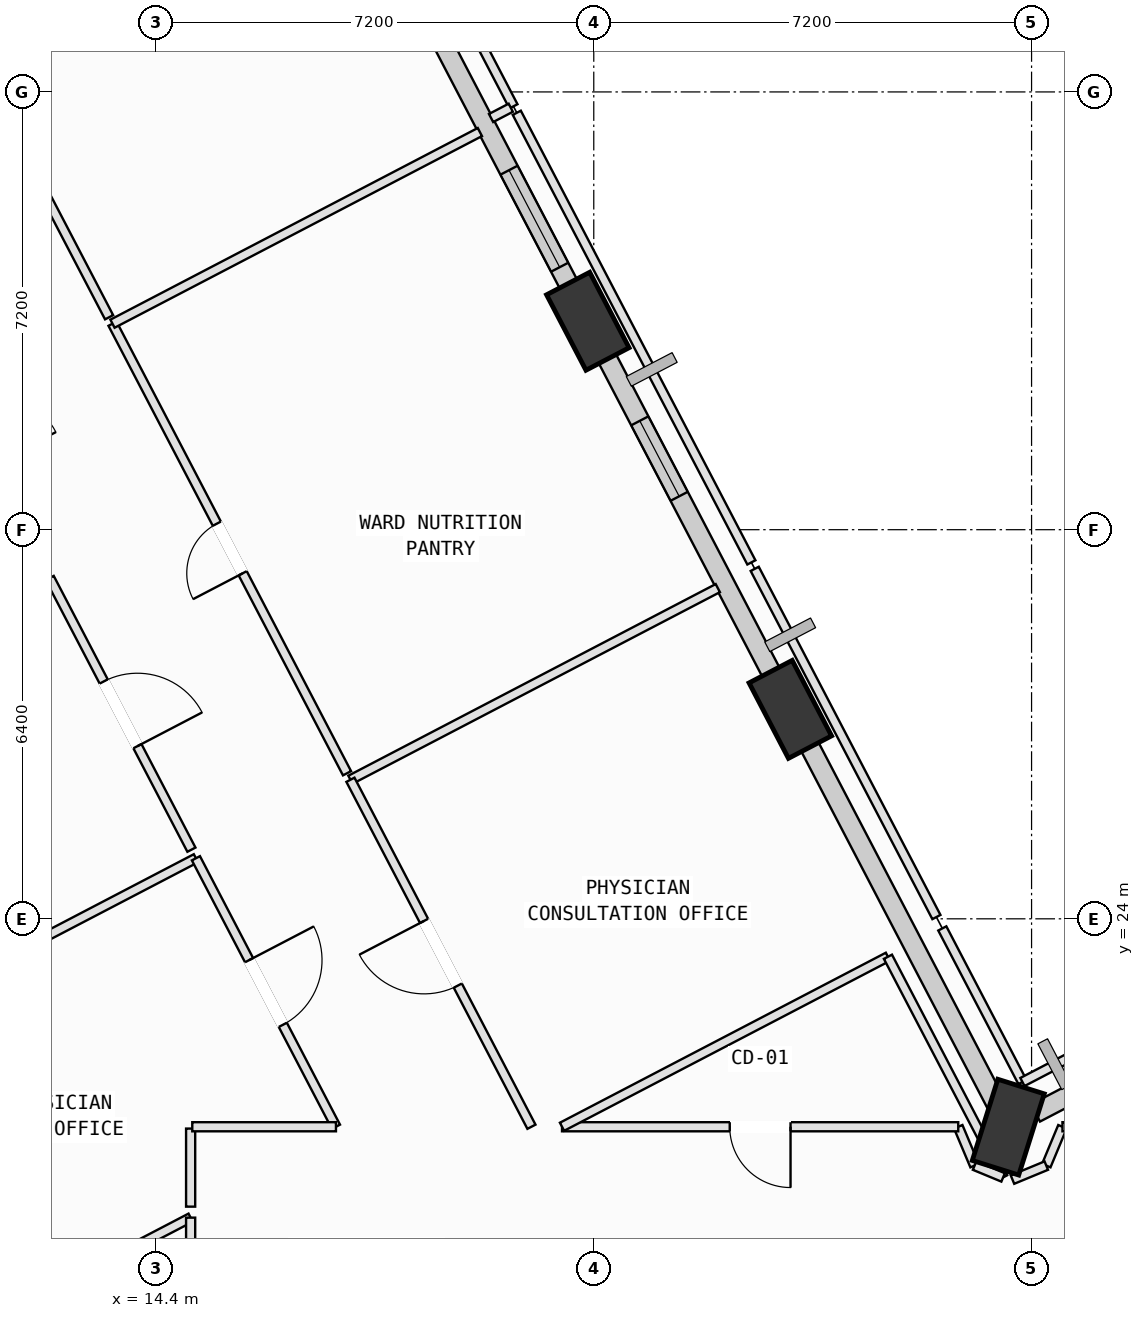
"""IFC4 building model, lengths in metres.
Left out: names, types, materials, properties, quantities, classifications, styles, units other than length and angle.
Written with IfcOpenShell. Run it as: python <this file> out.ifc"""

import sys

from ifc_helpers import new_model, si_unit, direction, frame, frame_2d, origin, origin_2d, place, context, subcontext, project, spatial, rectangle, extrude, element, fill, save


model = new_model("IFC4")
c1 = context("Model", 3, precision=1e-05, world=origin(), true_north=direction((0.0, 1.0)))
c2 = subcontext(c1, "Body", "Model", "MODEL_VIEW")
j1 = project(units=[si_unit("LENGTHUNIT", "METRE"), si_unit("PLANEANGLEUNIT", "RADIAN")], contexts=[c1])
p1 = place(None, origin())
s1 = spatial("IfcSite", under=j1, at=p1, CompositionType="ELEMENT")
p2 = place(p1, origin())
s2 = spatial("IfcBuilding", under=s1, at=p2, CompositionType="ELEMENT")
p3 = place(p2, frame((0.0, 0.0, 140.4)))
s3 = spatial("IfcBuildingStorey", under=s2, at=p3, CompositionType="ELEMENT", Elevation=140.4)
p4 = place(p3, frame((28.417, 20.573, 0.002), z_axis=(0.017686891787, -0.02131024809, 0.999616450037), x_axis=(-0.378280780857, 0.925313820027, 0.026419411466)))
e1 = element("IfcColumn", 1, at=p4, inside=s3, PredefinedType="COLUMN", context=c2, shape_type="SweptSolid", body=[
    extrude(rectangle(XDim=1.4, YDim=0.8, at=origin_2d()), origin(), (0.0, 0.0, 1.0), 3.975),
])
p5 = place(p3, frame((24.833, 27.445, 0.002), z_axis=(-0.01064440471, -0.036363255396, 0.999281947353), x_axis=(-0.194994759245, 0.980228833314, 0.033592829699)))
e2 = element("IfcColumn", 2, at=p5, inside=s3, PredefinedType="COLUMN", context=c2, shape_type="SweptSolid", body=[
    extrude(rectangle(XDim=1.4, YDim=0.8, at=origin_2d()), origin(), (0.0, 0.0, 1.0), 3.968),
])
p6 = place(p3, frame((21.502, 33.828, 0.002), z_axis=(-0.036932649589, -0.050396391412, 0.998046182863), x_axis=(0.149987895413, 0.987134715444, 0.055395710969)))
e3 = element("IfcColumn", 3, at=p6, inside=s3, PredefinedType="COLUMN", context=c2, shape_type="SweptSolid", body=[
    extrude(rectangle(XDim=1.4, YDim=0.8, at=origin_2d()), origin(), (0.0, 0.0, 1.0), 3.953),
])
p7 = place(p3, frame((18.727, 39.148, 0.002), z_axis=(-0.058783551583, -0.061942625482, 0.996347130879), x_axis=(0.272586926496, 0.959147545124, 0.075712311991)))
e4 = element("IfcColumn", 4, at=p7, inside=s3, PredefinedType="COLUMN", context=c2, shape_type="SweptSolid", body=[
    extrude(rectangle(XDim=1.4, YDim=0.8, at=origin_2d()), origin(), (0.0, 0.0, 1.0), 3.941),
])
p8 = place(p3, frame((28.865, 20.807, 0.0), z_axis=(0.0, 0.0, 1.0), x_axis=(0.886610408854, 0.462517008241, 0.0)))
e5 = element("IfcWall", 5, at=p8, inside=s3, PredefinedType="SOLIDWALL", context=c2, shape_type="SweptSolid", body=[
    extrude(rectangle(XDim=5.96, YDim=0.32, at=frame_2d((2.98, 0.0))), origin(), (0.0, 0.0, 1.0), 2.885),
])
p9 = place(p3, frame((25.086, 26.959, 0.0), z_axis=(0.0, 0.0, 1.0), x_axis=(0.462504291383, -0.886617042726, 0.0)))
e6 = element("IfcWall", 6, at=p9, inside=s3, PredefinedType="SOLIDWALL", context=c2, shape_type="SweptSolid", body=[
    extrude(rectangle(XDim=6.76, YDim=0.32, at=frame_2d((3.38, 0.0))), origin(), (0.0, 0.0, 1.0), 3.085),
])
p10 = place(p3, frame((21.751, 33.351, 0.0), z_axis=(0.0, 0.0, 1.0), x_axis=(0.462527122244, -0.88660513262, 0.0)))
e7 = element("IfcWall", 7, at=p10, inside=s3, PredefinedType="SOLIDWALL", context=c2, shape_type="SweptSolid", body=[
    extrude(rectangle(XDim=6.223, YDim=0.32, at=frame_2d((3.111, 0.0))), origin(), (0.0, 0.0, 1.0), 3.085),
])
p11 = place(p10, frame((1.309, 0.0, 0.75)))
e8 = element("IfcOpeningElement", 8, at=p11, cuts=e7, PredefinedType="OPENING", context=c2, shape_type="SweptSolid", body=[
    extrude(rectangle(XDim=1.4, YDim=1.85, at=frame_2d((0.7, 0.925))), frame((0.0, 0.17, 0.0), z_axis=(0.0, -1.0, 0.0), x_axis=(1.0, 0.0, 0.0)), (0.0, 0.0, 1.0), 0.34),
])
p12 = place(p3, frame((18.97, 38.683, 0.0), z_axis=(0.0, 0.0, 1.0), x_axis=(0.462529637731, -0.886603820328, 0.0)))
e9 = element("IfcWall", 9, at=p12, inside=s3, PredefinedType="SOLIDWALL", context=c2, shape_type="SweptSolid", body=[
    extrude(rectangle(XDim=5.047, YDim=0.32, at=frame_2d((2.523, 0.0))), origin(), (0.0, 0.0, 1.0), 3.085),
])
p13 = place(p12, frame((2.673, 0.0, 0.75)))
e10 = element("IfcOpeningElement", 10, at=p13, cuts=e9, PredefinedType="OPENING", context=c2, shape_type="SweptSolid", body=[
    extrude(rectangle(XDim=1.8, YDim=2.05, at=frame_2d((0.9, 1.025))), frame((0.0, 0.17, 0.0), z_axis=(0.0, -1.0, 0.0), x_axis=(1.0, 0.0, 0.0)), (0.0, 0.0, 1.0), 0.34),
])
p14 = place(p3, frame((7.74, 15.314, 0.0), z_axis=(0.0, 0.0, 1.0), x_axis=(0.886643562376, 0.46245344987, 0.0)))
e11 = element("IfcWall", 11, at=p14, inside=s3, PredefinedType="PARTITIONING", context=c2, shape_type="SweptSolid", body=[
    extrude(rectangle(XDim=8.154, YDim=0.15, at=frame_2d((4.077, 0.0))), origin(), (0.0, 0.0, 1.0), 3.7),
])
p15 = place(p14, frame((3.477, 0.0, 0.0)))
e12 = element("IfcOpeningElement", 12, at=p15, cuts=e11, PredefinedType="OPENING", context=c2, shape_type="SweptSolid", body=[
    extrude(rectangle(XDim=1.2, YDim=2.15, at=frame_2d((0.6, 1.075))), frame((0.0, 0.085, 0.0), z_axis=(0.0, -1.0, 0.0), x_axis=(1.0, 0.0, 0.0)), (0.0, 0.0, 1.0), 0.17),
])
p16 = place(p3, frame((14.97, 19.085, 0.0), z_axis=(0.0, 0.0, 1.0), x_axis=(0.0, -1.0, 0.0)))
e13 = element("IfcWall", 13, at=p16, inside=s3, PredefinedType="PARTITIONING", context=c2, shape_type="SweptSolid", body=[
    extrude(rectangle(XDim=0.855, YDim=0.15, at=frame_2d((0.427, 0.0))), origin(), (0.0, 0.0, 1.0), 3.7),
])
p17 = place(p3, frame((14.97, 20.55, 0.0), z_axis=(0.0, 0.0, 1.0), x_axis=(0.0, -1.0, 0.0)))
e14 = element("IfcWall", 14, at=p17, inside=s3, PredefinedType="PARTITIONING", context=c2, shape_type="SweptSolid", body=[
    extrude(rectangle(XDim=1.284, YDim=0.15, at=frame_2d((0.642, 0.0))), origin(), (0.0, 0.0, 1.0), 2.885),
])
p18 = place(p3, frame((5.28, 19.895, 0.0), z_axis=(0.0, 0.0, 1.0), x_axis=(0.886580898603, 0.462573572777, 0.0)))
e15 = element("IfcWall", 15, at=p18, inside=s3, PredefinedType="PARTITIONING", context=c2, shape_type="SweptSolid", body=[
    extrude(rectangle(XDim=11.028, YDim=0.15, at=frame_2d((5.514, 0.0))), origin(), (0.0, 0.0, 1.0), 3.7),
])
p19 = place(p3, frame((15.057, 24.996, 0.0), z_axis=(0.0, 0.0, 1.0), x_axis=(0.462442035221, -0.886649515908, 0.0)))
e16 = element("IfcWall", 16, at=p19, inside=s3, PredefinedType="PARTITIONING", context=c2, shape_type="SweptSolid", body=[
    extrude(rectangle(XDim=4.98, YDim=0.15, at=frame_2d((2.49, 0.0))), origin(), (0.0, 0.0, 1.0), 3.7),
])
p20 = place(p19, frame((1.89, 0.0, 0.0)))
e17 = element("IfcOpeningElement", 17, at=p20, cuts=e16, PredefinedType="OPENING", context=c2, shape_type="SweptSolid", body=[
    extrude(rectangle(XDim=1.2, YDim=2.15, at=frame_2d((0.6, 1.075))), frame((0.0, 0.085, 0.0), z_axis=(0.0, -1.0, 0.0), x_axis=(1.0, 0.0, 0.0)), (0.0, 0.0, 1.0), 0.17),
])
p21 = place(p3, frame((17.36, 20.58, 0.0), z_axis=(0.0, 0.0, 1.0), x_axis=(-1.0, 0.0, 0.0)))
e18 = element("IfcWall", 18, at=p21, inside=s3, PredefinedType="PARTITIONING", context=c2, shape_type="SweptSolid", body=[
    extrude(rectangle(XDim=2.363, YDim=0.15, at=frame_2d((1.182, 0.0))), origin(), (0.0, 0.0, 1.0), 3.7),
])
p22 = place(p3, frame((2.93, 24.534, 0.0), z_axis=(0.0, 0.0, 1.0), x_axis=(0.886600327973, 0.462536332019, 0.0)))
e19 = element("IfcWall", 19, at=p22, inside=s3, PredefinedType="PARTITIONING", context=c2, shape_type="SweptSolid", body=[
    extrude(rectangle(XDim=10.966, YDim=0.15, at=frame_2d((5.483, 0.0))), origin(), (0.0, 0.0, 1.0), 3.285),
])
p23 = place(p3, frame((12.652, 29.606, 0.0), z_axis=(0.0, 0.0, 1.0), x_axis=(0.462435226927, -0.886653066817, 0.0)))
e20 = element("IfcWall", 20, at=p23, inside=s3, PredefinedType="PARTITIONING", context=c2, shape_type="SweptSolid", body=[
    extrude(rectangle(XDim=5.04, YDim=0.15, at=frame_2d((2.52, 0.0))), origin(), (0.0, 0.0, 1.0), 3.7),
])
p24 = place(p23, frame((1.92, 0.0, 0.0)))
e21 = element("IfcOpeningElement", 21, at=p24, cuts=e20, PredefinedType="OPENING", context=c2, shape_type="SweptSolid", body=[
    extrude(rectangle(XDim=1.2, YDim=2.15, at=frame_2d((0.6, 1.075))), frame((0.0, 0.085, 0.0), z_axis=(0.0, -1.0, 0.0), x_axis=(1.0, 0.0, 0.0)), (0.0, 0.0, 1.0), 0.17),
])
p25 = place(p3, frame((27.863, 19.941, 0.0), z_axis=(0.0, 0.0, 1.0), x_axis=(-0.387962564942, 0.921675131596, 0.0)))
e22 = element("IfcWall", 22, at=p25, inside=s3, PredefinedType="PARTITIONING", context=c2, shape_type="SweptSolid", body=[
    extrude(rectangle(XDim=0.693, YDim=0.15, at=frame_2d((0.347, 0.0))), origin(), (0.0, 0.0, 1.0), 3.7),
])
p26 = place(p3, frame((27.594, 20.58, 0.0), z_axis=(0.0, 0.0, 1.0), x_axis=(-1.0, 0.0, 0.0)))
e23 = element("IfcWall", 23, at=p26, inside=s3, PredefinedType="PARTITIONING", context=c2, shape_type="SweptSolid", body=[
    extrude(rectangle(XDim=6.516, YDim=0.15, at=frame_2d((3.258, 0.0))), origin(), (0.0, 0.0, 1.0), 3.7),
])
p27 = place(p26, frame((2.758, 0.0, 0.0)))
e24 = element("IfcOpeningElement", 24, at=p27, cuts=e23, PredefinedType="OPENING", context=c2, shape_type="SweptSolid", body=[
    extrude(rectangle(XDim=1.0, YDim=2.12, at=frame_2d((0.5, 1.06))), frame((0.0, 0.085, 0.0), z_axis=(0.0, -1.0, 0.0), x_axis=(1.0, 0.0, 0.0)), (0.0, 0.0, 1.0), 0.17),
])
p28 = place(p3, frame((21.078, 20.58, 0.0), z_axis=(0.0, 0.0, 1.0), x_axis=(0.886630926341, 0.46247767563, 0.0)))
e25 = element("IfcWall", 25, at=p28, inside=s3, PredefinedType="PARTITIONING", context=c2, shape_type="SweptSolid", body=[
    extrude(rectangle(XDim=6.045, YDim=0.15, at=frame_2d((3.023, 0.0))), origin(), (0.0, 0.0, 1.0), 3.7),
])
p29 = place(p3, frame((26.438, 23.376, 0.0), z_axis=(0.0, 0.0, 1.0), x_axis=(0.462700527586, -0.886514648368, 0.0)))
e26 = element("IfcWall", 26, at=p29, inside=s3, PredefinedType="PARTITIONING", context=c2, shape_type="SweptSolid", body=[
    extrude(rectangle(XDim=4.094, YDim=0.15, at=frame_2d((2.047, 0.0))), origin(), (0.0, 0.0, 1.0), 3.085),
])
p30 = place(p3, frame((28.332, 19.747, 0.0), z_axis=(0.0, 0.0, 1.0), x_axis=(-0.924169144122, 0.381983498403, 0.0)))
e27 = element("IfcWall", 27, at=p30, inside=s3, PredefinedType="PARTITIONING", context=c2, shape_type="SweptSolid", body=[
    extrude(rectangle(XDim=0.508, YDim=0.15, at=frame_2d((0.254, 0.0))), origin(), (0.0, 0.0, 1.0), 3.7),
])
p31 = place(p3, frame((29.308, 20.58, 0.0), z_axis=(0.0, 0.0, 1.0), x_axis=(-0.384364983418, -0.923181217054, 0.0)))
e28 = element("IfcWall", 28, at=p31, inside=s3, PredefinedType="PARTITIONING", context=c2, shape_type="SweptSolid", body=[
    extrude(rectangle(XDim=0.692, YDim=0.15, at=frame_2d((0.346, 0.0))), origin(), (0.0, 0.0, 1.0), 3.7),
])
p32 = place(p3, frame((29.042, 19.941, 0.0), z_axis=(0.0, 0.0, 1.0), x_axis=(-0.92404649346, -0.382280104014, 0.0)))
e29 = element("IfcWall", 29, at=p32, inside=s3, PredefinedType="PARTITIONING", context=c2, shape_type="SweptSolid", body=[
    extrude(rectangle(XDim=0.602, YDim=0.15, at=frame_2d((0.301, 0.0))), origin(), (0.0, 0.0, 1.0), 3.7),
])
p33 = place(p3, frame((27.332, 23.842, 0.0), z_axis=(0.0, 0.0, 1.0), x_axis=(0.462536722732, -0.88660012414, 0.0)))
e30 = element("IfcWall", 30, at=p33, inside=s3, PredefinedType="PARTITIONING", context=c2, shape_type="SweptSolid", body=[
    extrude(rectangle(XDim=2.849, YDim=0.15, at=frame_2d((1.425, 0.0))), origin(), (0.0, 0.0, 1.0), 3.7),
])
p34 = place(p3, frame((28.65, 21.316, 0.0), z_axis=(0.0, 0.0, 1.0), x_axis=(0.886634210414, 0.462471379573, 0.0)))
e31 = element("IfcWall", 31, at=p34, inside=s3, PredefinedType="PARTITIONING", context=c2, shape_type="SweptSolid", body=[
    extrude(rectangle(XDim=5.908, YDim=0.15, at=frame_2d((2.954, 0.0))), origin(), (0.0, 0.0, 1.0), 3.7),
])
p35 = place(p3, frame((34.462, 20.58, 0.0), z_axis=(0.0, 0.0, 1.0), x_axis=(-1.0, 0.0, 0.0)))
e32 = element("IfcWall", 32, at=p35, inside=s3, PredefinedType="PARTITIONING", context=c2, shape_type="SweptSolid", body=[
    extrude(rectangle(XDim=5.154, YDim=0.15, at=frame_2d((2.577, 0.0))), origin(), (0.0, 0.0, 1.0), 3.285),
])
p36 = place(p35, frame((2.077, 0.0, 0.0)))
e33 = element("IfcOpeningElement", 33, at=p36, cuts=e32, PredefinedType="OPENING", context=c2, shape_type="SweptSolid", body=[
    extrude(rectangle(XDim=1.0, YDim=2.12, at=frame_2d((0.5, 1.06))), frame((0.0, 0.085, 0.0), z_axis=(0.0, -1.0, 0.0), x_axis=(1.0, 0.0, 0.0)), (0.0, 0.0, 1.0), 0.17),
])
p37 = place(p3, frame((17.598, 26.287, 0.0), z_axis=(0.0, 0.0, 1.0), x_axis=(0.886614228897, 0.462509685431, 0.0)))
e34 = element("IfcWall", 34, at=p37, inside=s3, PredefinedType="PARTITIONING", context=c2, shape_type="SweptSolid", body=[
    extrude(rectangle(XDim=6.815, YDim=0.15, at=frame_2d((3.407, 0.0))), origin(), (0.0, 0.0, 1.0), 3.7),
])
p38 = place(p3, frame((24.247, 29.756, 0.0), z_axis=(0.0, 0.0, 1.0), x_axis=(0.462567298335, -0.886584172265, 0.0)))
e35 = element("IfcWall", 35, at=p38, inside=s3, PredefinedType="PARTITIONING", context=c2, shape_type="SweptSolid", body=[
    extrude(rectangle(XDim=6.46, YDim=0.15, at=frame_2d((3.23, 0.0))), origin(), (0.0, 0.0, 1.0), 3.7),
])
p39 = place(p3, frame((20.575, 20.58, 0.0), z_axis=(0.0, 0.0, 1.0), x_axis=(-0.462501194351, 0.886618658288, 0.0)))
e36 = element("IfcWall", 36, at=p39, inside=s3, PredefinedType="PARTITIONING", context=c2, shape_type="SweptSolid", body=[
    extrude(rectangle(XDim=6.437, YDim=0.15, at=frame_2d((3.218, 0.0))), origin(), (0.0, 0.0, 1.0), 3.7),
])
p40 = place(p39, frame((2.618, 0.0, 0.0)))
e37 = element("IfcOpeningElement", 37, at=p40, cuts=e36, PredefinedType="OPENING", context=c2, shape_type="SweptSolid", body=[
    extrude(rectangle(XDim=1.2, YDim=2.15, at=frame_2d((0.6, 1.075))), frame((0.0, 0.085, 0.0), z_axis=(0.0, -1.0, 0.0), x_axis=(1.0, 0.0, 0.0)), (0.0, 0.0, 1.0), 0.17),
])
p41 = place(p3, frame((17.542, 26.394, 0.0), z_axis=(0.0, 0.0, 1.0), x_axis=(-0.46248796698, 0.886625558169, 0.0)))
e38 = element("IfcWall", 38, at=p41, inside=s3, PredefinedType="PARTITIONING", context=c2, shape_type="SweptSolid", body=[
    extrude(rectangle(XDim=8.34, YDim=0.15, at=frame_2d((4.17, 0.0))), origin(), (0.0, 0.0, 1.0), 3.7),
])
p42 = place(p41, frame((3.71, 0.0, 0.0)))
e39 = element("IfcOpeningElement", 39, at=p42, cuts=e38, PredefinedType="OPENING", context=c2, shape_type="SweptSolid", body=[
    extrude(rectangle(XDim=0.92, YDim=2.1, at=frame_2d((0.46, 1.05))), frame((0.0, 0.085, 0.0), z_axis=(0.0, -1.0, 0.0), x_axis=(1.0, 0.0, 0.0)), (0.0, 0.0, 1.0), 0.17),
])
p43 = place(p3, frame((13.685, 33.788, 0.0), z_axis=(0.0, 0.0, 1.0), x_axis=(0.886614228897, 0.462509685431, 0.0)))
e40 = element("IfcWall", 40, at=p43, inside=s3, PredefinedType="PARTITIONING", context=c2, shape_type="SweptSolid", body=[
    extrude(rectangle(XDim=6.815, YDim=0.15, at=frame_2d((3.407, 0.0))), origin(), (0.0, 0.0, 1.0), 3.7),
])
p44 = place(p3, frame((20.334, 37.257, 0.0), z_axis=(0.0, 0.0, 1.0), x_axis=(0.462531995197, -0.886602590465, 0.0)))
e41 = element("IfcWall", 41, at=p44, inside=s3, PredefinedType="PARTITIONING", context=c2, shape_type="SweptSolid", body=[
    extrude(rectangle(XDim=8.341, YDim=0.15, at=frame_2d((4.17, 0.0))), origin(), (0.0, 0.0, 1.0), 3.7),
])
p45 = place(p3, frame((16.949, 43.747, 0.0), z_axis=(0.0, 0.0, 1.0), x_axis=(0.462487208348, -0.886625953892, 0.0)))
e42 = element("IfcWall", 42, at=p45, inside=s3, PredefinedType="PARTITIONING", context=c2, shape_type="SweptSolid", body=[
    extrude(rectangle(XDim=7.2, YDim=0.15, at=frame_2d((3.6, 0.0))), origin(), (0.0, 0.0, 1.0), 3.7),
])
p46 = place(p3, frame((20.235, 37.34, 0.0), z_axis=(0.0, 0.0, 1.0), x_axis=(-0.886549133333, -0.462634449849, 0.0)))
e43 = element("IfcWall", 43, at=p46, inside=s3, PredefinedType="PARTITIONING", context=c2, shape_type="SweptSolid", body=[
    extrude(rectangle(XDim=0.366, YDim=0.15, at=frame_2d((0.183, 0.0))), origin(), (0.0, 0.0, 1.0), 3.7),
])
p47 = place(p3, frame((13.629, 33.894, 0.0), z_axis=(0.0, 0.0, 1.0), x_axis=(-0.462450459837, 0.886645121904, 0.0)))
e44 = element("IfcWall", 44, at=p47, inside=s3, PredefinedType="PARTITIONING", context=c2, shape_type="SweptSolid", body=[
    extrude(rectangle(XDim=8.016, YDim=0.15, at=frame_2d((4.008, 0.0))), origin(), (0.0, 0.0, 1.0), 3.7),
])
p48 = place(p47, frame((3.548, 0.0, 0.0)))
e45 = element("IfcOpeningElement", 45, at=p48, cuts=e44, PredefinedType="OPENING", context=c2, shape_type="SweptSolid", body=[
    extrude(rectangle(XDim=0.92, YDim=2.1, at=frame_2d((0.46, 1.05))), frame((0.0, 0.085, 0.0), z_axis=(0.0, -1.0, 0.0), x_axis=(1.0, 0.0, 0.0)), (0.0, 0.0, 1.0), 0.17),
])
p49 = place(p11, origin())
e46 = element("IfcWindow", 46, at=p49, inside=s3, PartitioningType="SINGLE_PANEL", PredefinedType="WINDOW", context=c2, shape_type="SweptSolid", body=[
    extrude(rectangle(XDim=1.4, YDim=1.85, at=frame_2d((0.7, 0.925))), frame((0.0, 0.03, 0.0), z_axis=(0.0, -1.0, 0.0), x_axis=(1.0, 0.0, 0.0)), (0.0, 0.0, 1.0), 0.06),
])
fill(e8, e46)
p50 = place(p13, origin())
e47 = element("IfcWindow", 47, at=p50, inside=s3, PartitioningType="SINGLE_PANEL", PredefinedType="WINDOW", context=c2, shape_type="SweptSolid", body=[
    extrude(rectangle(XDim=1.8, YDim=2.05, at=frame_2d((0.9, 1.025))), frame((0.0, 0.03, 0.0), z_axis=(0.0, -1.0, 0.0), x_axis=(1.0, 0.0, 0.0)), (0.0, 0.0, 1.0), 0.06),
])
fill(e10, e47)
p51 = place(p20, origin())
e48 = element("IfcDoor", 48, at=p51, inside=s3, OperationType="SINGLE_SWING_LEFT", PredefinedType="DOOR", context=c2, shape_type="SweptSolid", body=[
    extrude(rectangle(XDim=1.2, YDim=2.15, at=frame_2d((0.6, 1.075))), frame((0.0, 0.025, 0.0), z_axis=(0.0, -1.0, 0.0), x_axis=(1.0, 0.0, 0.0)), (0.0, 0.0, 1.0), 0.05),
])
fill(e17, e48)
p52 = place(p24, origin())
e49 = element("IfcDoor", 49, at=p52, inside=s3, OperationType="SINGLE_SWING_RIGHT", PredefinedType="DOOR", context=c2, shape_type="SweptSolid", body=[
    extrude(rectangle(XDim=1.2, YDim=2.15, at=frame_2d((0.6, 1.075))), frame((0.0, 0.025, 0.0), z_axis=(0.0, -1.0, 0.0), x_axis=(1.0, 0.0, 0.0)), (0.0, 0.0, 1.0), 0.05),
])
fill(e21, e49)
p53 = place(p27, origin())
e50 = element("IfcDoor", 50, at=p53, inside=s3, OperationType="SINGLE_SWING_LEFT", PredefinedType="DOOR", context=c2, shape_type="SweptSolid", body=[
    extrude(rectangle(XDim=1.0, YDim=2.12, at=frame_2d((0.5, 1.06))), frame((0.0, 0.025, 0.0), z_axis=(0.0, -1.0, 0.0), x_axis=(1.0, 0.0, 0.0)), (0.0, 0.0, 1.0), 0.05),
])
fill(e24, e50)
p54 = place(p40, origin())
e51 = element("IfcDoor", 51, at=p54, inside=s3, OperationType="SINGLE_SWING_RIGHT", PredefinedType="DOOR", context=c2, shape_type="SweptSolid", body=[
    extrude(rectangle(XDim=1.2, YDim=2.15, at=frame_2d((0.6, 1.075))), frame((0.0, 0.025, 0.0), z_axis=(0.0, -1.0, 0.0), x_axis=(1.0, 0.0, 0.0)), (0.0, 0.0, 1.0), 0.05),
])
fill(e37, e51)
p55 = place(p42, origin())
e52 = element("IfcDoor", 52, at=p55, inside=s3, OperationType="SINGLE_SWING_LEFT", PredefinedType="DOOR", context=c2, shape_type="SweptSolid", body=[
    extrude(rectangle(XDim=0.92, YDim=2.1, at=frame_2d((0.46, 1.05))), frame((0.0, 0.025, 0.0), z_axis=(0.0, -1.0, 0.0), x_axis=(1.0, 0.0, 0.0)), (0.0, 0.0, 1.0), 0.05),
])
fill(e39, e52)
save(model, sys.argv[1])
